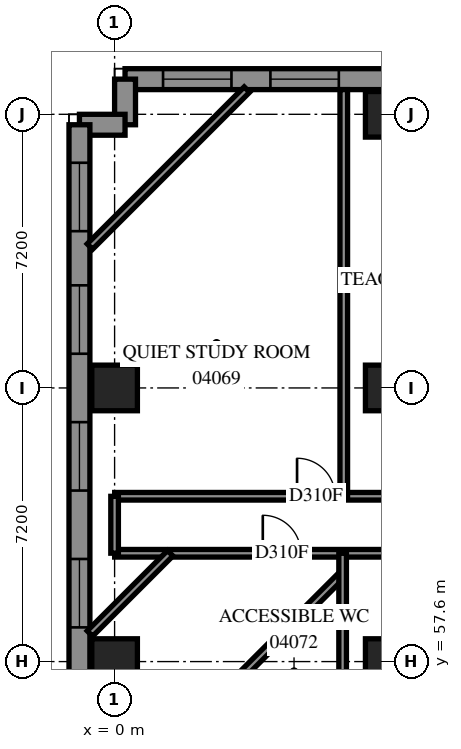
"""IFC4 building model, lengths in metres.
Left out: names, types, materials, properties, quantities, classifications, styles, units other than length and angle.
Written with IfcOpenShell. Run it as: python <this file> out.ifc"""

import sys

from ifc_helpers import new_model, si_unit, direction, frame, frame_2d, origin, origin_2d, place, context, subcontext, project, spatial, polyline, rectangle, outline, extrude, element, fill, save


model = new_model("IFC4")
c1 = context("Model", 3, precision=1e-05, world=origin(), true_north=direction((0.0, 1.0)))
c2 = subcontext(c1, "Body", "Model", "MODEL_VIEW")
j1 = project(units=[si_unit("LENGTHUNIT", "METRE"), si_unit("PLANEANGLEUNIT", "RADIAN")], contexts=[c1])
p1 = place(None, origin())
s1 = spatial("IfcSite", under=j1, at=p1, CompositionType="ELEMENT")
p2 = place(p1, origin())
s2 = spatial("IfcBuilding", under=s1, at=p2, CompositionType="ELEMENT")
p3 = place(p2, frame((0.0, 0.0, 18.6)))
s3 = spatial("IfcBuildingStorey", under=s2, at=p3, CompositionType="ELEMENT", Elevation=18.6)
for number, where, z_axis, x_axis in (
    (1, (0.0, 57.6, 0.0), (0.0, 0.0, 1.0), (1.0, 0.0, 0.0)),
    (2, (0.0, 64.8, 0.0), (0.0, 0.0, 1.0), (1.0, 0.0, 0.0)),
    (3, (7.2, 57.6, 0.0), (0.0, 0.0, 1.0), (1.0, 0.0, 0.0)),
    (4, (7.2, 64.8, 0.0), (0.0, 0.0, 1.0), (1.0, 0.0, 0.0)),
    (5, (7.2, 72.0, 0.0), (0.0, 0.0, 1.0), (1.0, 0.0, 0.0)),
):
    element("IfcColumn", number, at=place(p3, frame(where, z_axis=z_axis, x_axis=x_axis)), inside=s3, PredefinedType="COLUMN", context=c2, shape_type="SweptSolid", body=[
        extrude(rectangle(XDim=1.2, YDim=1.2, at=origin_2d()), origin(), (0.0, 0.0, 1.0), 3.8),
    ])
p4 = place(p3, frame((79.583, 72.925, 0.0), z_axis=(0.0, 0.0, 1.0), x_axis=(-1.0, 0.0, 0.0)))
e6 = element("IfcWall", 6, at=p4, inside=s3, PredefinedType="SOLIDWALL", context=c2, shape_type="SweptSolid", body=[
    extrude(outline(polyline([(-0.114, -0.275), (79.583, -0.275), (79.033, 0.275), (0.114, 0.275), (-0.114, -0.275)])), origin(), (0.0, 0.0, 1.0), 3.8),
])
p5 = place(p4, frame((1.249, 0.0, 0.7)))
e7 = element("IfcOpeningElement", 7, at=p5, cuts=e6, PredefinedType="OPENING", context=c2, shape_type="SweptSolid", body=[
    extrude(rectangle(XDim=1.8, YDim=2.4, at=frame_2d((0.9, 1.2))), frame((0.0, 0.285, 0.0), z_axis=(0.0, -1.0, 0.0), x_axis=(1.0, 0.0, 0.0)), (0.0, 0.0, 1.0), 0.57),
])
p6 = place(p4, frame((4.883, 0.0, 0.7)))
e8 = element("IfcOpeningElement", 8, at=p6, cuts=e6, PredefinedType="OPENING", context=c2, shape_type="SweptSolid", body=[
    extrude(rectangle(XDim=1.8, YDim=2.4, at=frame_2d((0.9, 1.2))), frame((0.0, 0.285, 0.0), z_axis=(0.0, -1.0, 0.0), x_axis=(1.0, 0.0, 0.0)), (0.0, 0.0, 1.0), 0.57),
])
p7 = place(p4, frame((8.483, 0.0, 0.7)))
e9 = element("IfcOpeningElement", 9, at=p7, cuts=e6, PredefinedType="OPENING", context=c2, shape_type="SweptSolid", body=[
    extrude(rectangle(XDim=1.8, YDim=2.4, at=frame_2d((0.9, 1.2))), frame((0.0, 0.285, 0.0), z_axis=(0.0, -1.0, 0.0), x_axis=(1.0, 0.0, 0.0)), (0.0, 0.0, 1.0), 0.57),
])
p8 = place(p4, frame((12.083, 0.0, 0.7)))
e10 = element("IfcOpeningElement", 10, at=p8, cuts=e6, PredefinedType="OPENING", context=c2, shape_type="SweptSolid", body=[
    extrude(rectangle(XDim=1.8, YDim=2.4, at=frame_2d((0.9, 1.2))), frame((0.0, 0.285, 0.0), z_axis=(0.0, -1.0, 0.0), x_axis=(1.0, 0.0, 0.0)), (0.0, 0.0, 1.0), 0.57),
])
p9 = place(p4, frame((15.683, 0.0, 0.7)))
e11 = element("IfcOpeningElement", 11, at=p9, cuts=e6, PredefinedType="OPENING", context=c2, shape_type="SweptSolid", body=[
    extrude(rectangle(XDim=1.8, YDim=2.4, at=frame_2d((0.9, 1.2))), frame((0.0, 0.285, 0.0), z_axis=(0.0, -1.0, 0.0), x_axis=(1.0, 0.0, 0.0)), (0.0, 0.0, 1.0), 0.57),
])
p10 = place(p4, frame((19.283, 0.0, 0.7)))
e12 = element("IfcOpeningElement", 12, at=p10, cuts=e6, PredefinedType="OPENING", context=c2, shape_type="SweptSolid", body=[
    extrude(rectangle(XDim=1.8, YDim=2.4, at=frame_2d((0.9, 1.2))), frame((0.0, 0.285, 0.0), z_axis=(0.0, -1.0, 0.0), x_axis=(1.0, 0.0, 0.0)), (0.0, 0.0, 1.0), 0.57),
])
p11 = place(p4, frame((22.883, 0.0, 0.7)))
e13 = element("IfcOpeningElement", 13, at=p11, cuts=e6, PredefinedType="OPENING", context=c2, shape_type="SweptSolid", body=[
    extrude(rectangle(XDim=1.8, YDim=2.4, at=frame_2d((0.9, 1.2))), frame((0.0, 0.285, 0.0), z_axis=(0.0, -1.0, 0.0), x_axis=(1.0, 0.0, 0.0)), (0.0, 0.0, 1.0), 0.57),
])
p12 = place(p4, frame((26.483, 0.0, 0.7)))
e14 = element("IfcOpeningElement", 14, at=p12, cuts=e6, PredefinedType="OPENING", context=c2, shape_type="SweptSolid", body=[
    extrude(rectangle(XDim=1.8, YDim=2.4, at=frame_2d((0.9, 1.2))), frame((0.0, 0.285, 0.0), z_axis=(0.0, -1.0, 0.0), x_axis=(1.0, 0.0, 0.0)), (0.0, 0.0, 1.0), 0.57),
])
p13 = place(p4, frame((30.083, 0.0, 0.7)))
e15 = element("IfcOpeningElement", 15, at=p13, cuts=e6, PredefinedType="OPENING", context=c2, shape_type="SweptSolid", body=[
    extrude(rectangle(XDim=1.8, YDim=2.4, at=frame_2d((0.9, 1.2))), frame((0.0, 0.285, 0.0), z_axis=(0.0, -1.0, 0.0), x_axis=(1.0, 0.0, 0.0)), (0.0, 0.0, 1.0), 0.57),
])
p14 = place(p4, frame((33.683, 0.0, 0.7)))
e16 = element("IfcOpeningElement", 16, at=p14, cuts=e6, PredefinedType="OPENING", context=c2, shape_type="SweptSolid", body=[
    extrude(rectangle(XDim=1.8, YDim=2.4, at=frame_2d((0.9, 1.2))), frame((0.0, 0.285, 0.0), z_axis=(0.0, -1.0, 0.0), x_axis=(1.0, 0.0, 0.0)), (0.0, 0.0, 1.0), 0.57),
])
p15 = place(p4, frame((37.283, 0.0, 0.7)))
e17 = element("IfcOpeningElement", 17, at=p15, cuts=e6, PredefinedType="OPENING", context=c2, shape_type="SweptSolid", body=[
    extrude(rectangle(XDim=1.8, YDim=2.4, at=frame_2d((0.9, 1.2))), frame((0.0, 0.285, 0.0), z_axis=(0.0, -1.0, 0.0), x_axis=(1.0, 0.0, 0.0)), (0.0, 0.0, 1.0), 0.57),
])
p16 = place(p4, frame((40.883, 0.0, 0.7)))
e18 = element("IfcOpeningElement", 18, at=p16, cuts=e6, PredefinedType="OPENING", context=c2, shape_type="SweptSolid", body=[
    extrude(rectangle(XDim=1.8, YDim=2.4, at=frame_2d((0.9, 1.2))), frame((0.0, 0.285, 0.0), z_axis=(0.0, -1.0, 0.0), x_axis=(1.0, 0.0, 0.0)), (0.0, 0.0, 1.0), 0.57),
])
p17 = place(p4, frame((44.483, 0.0, 0.7)))
e19 = element("IfcOpeningElement", 19, at=p17, cuts=e6, PredefinedType="OPENING", context=c2, shape_type="SweptSolid", body=[
    extrude(rectangle(XDim=1.8, YDim=2.4, at=frame_2d((0.9, 1.2))), frame((0.0, 0.285, 0.0), z_axis=(0.0, -1.0, 0.0), x_axis=(1.0, 0.0, 0.0)), (0.0, 0.0, 1.0), 0.57),
])
p18 = place(p4, frame((48.083, 0.0, 0.7)))
e20 = element("IfcOpeningElement", 20, at=p18, cuts=e6, PredefinedType="OPENING", context=c2, shape_type="SweptSolid", body=[
    extrude(rectangle(XDim=1.8, YDim=2.4, at=frame_2d((0.9, 1.2))), frame((0.0, 0.285, 0.0), z_axis=(0.0, -1.0, 0.0), x_axis=(1.0, 0.0, 0.0)), (0.0, 0.0, 1.0), 0.57),
])
p19 = place(p4, frame((51.683, 0.0, 0.7)))
e21 = element("IfcOpeningElement", 21, at=p19, cuts=e6, PredefinedType="OPENING", context=c2, shape_type="SweptSolid", body=[
    extrude(rectangle(XDim=1.8, YDim=2.4, at=frame_2d((0.9, 1.2))), frame((0.0, 0.285, 0.0), z_axis=(0.0, -1.0, 0.0), x_axis=(1.0, 0.0, 0.0)), (0.0, 0.0, 1.0), 0.57),
])
p20 = place(p4, frame((55.283, 0.0, 0.7)))
e22 = element("IfcOpeningElement", 22, at=p20, cuts=e6, PredefinedType="OPENING", context=c2, shape_type="SweptSolid", body=[
    extrude(rectangle(XDim=1.8, YDim=2.4, at=frame_2d((0.9, 1.2))), frame((0.0, 0.285, 0.0), z_axis=(0.0, -1.0, 0.0), x_axis=(1.0, 0.0, 0.0)), (0.0, 0.0, 1.0), 0.57),
])
p21 = place(p4, frame((58.883, 0.0, 0.7)))
e23 = element("IfcOpeningElement", 23, at=p21, cuts=e6, PredefinedType="OPENING", context=c2, shape_type="SweptSolid", body=[
    extrude(rectangle(XDim=1.8, YDim=2.4, at=frame_2d((0.9, 1.2))), frame((0.0, 0.285, 0.0), z_axis=(0.0, -1.0, 0.0), x_axis=(1.0, 0.0, 0.0)), (0.0, 0.0, 1.0), 0.57),
])
p22 = place(p4, frame((62.483, 0.0, 0.7)))
e24 = element("IfcOpeningElement", 24, at=p22, cuts=e6, PredefinedType="OPENING", context=c2, shape_type="SweptSolid", body=[
    extrude(rectangle(XDim=1.8, YDim=2.4, at=frame_2d((0.9, 1.2))), frame((0.0, 0.285, 0.0), z_axis=(0.0, -1.0, 0.0), x_axis=(1.0, 0.0, 0.0)), (0.0, 0.0, 1.0), 0.57),
])
p23 = place(p4, frame((66.083, 0.0, 0.7)))
e25 = element("IfcOpeningElement", 25, at=p23, cuts=e6, PredefinedType="OPENING", context=c2, shape_type="SweptSolid", body=[
    extrude(rectangle(XDim=1.8, YDim=2.4, at=frame_2d((0.9, 1.2))), frame((0.0, 0.285, 0.0), z_axis=(0.0, -1.0, 0.0), x_axis=(1.0, 0.0, 0.0)), (0.0, 0.0, 1.0), 0.57),
])
p24 = place(p4, frame((69.683, 0.0, 0.7)))
e26 = element("IfcOpeningElement", 26, at=p24, cuts=e6, PredefinedType="OPENING", context=c2, shape_type="SweptSolid", body=[
    extrude(rectangle(XDim=1.8, YDim=2.4, at=frame_2d((0.9, 1.2))), frame((0.0, 0.285, 0.0), z_axis=(0.0, -1.0, 0.0), x_axis=(1.0, 0.0, 0.0)), (0.0, 0.0, 1.0), 0.57),
])
p25 = place(p4, frame((73.683, 0.0, 0.7)))
e27 = element("IfcOpeningElement", 27, at=p25, cuts=e6, PredefinedType="OPENING", context=c2, shape_type="SweptSolid", body=[
    extrude(rectangle(XDim=1.8, YDim=2.4, at=frame_2d((0.9, 1.2))), frame((0.0, 0.285, 0.0), z_axis=(0.0, -1.0, 0.0), x_axis=(1.0, 0.0, 0.0)), (0.0, 0.0, 1.0), 0.57),
])
p26 = place(p4, frame((76.508, 0.0, 0.7)))
e28 = element("IfcOpeningElement", 28, at=p26, cuts=e6, PredefinedType="OPENING", context=c2, shape_type="SweptSolid", body=[
    extrude(rectangle(XDim=1.8, YDim=2.4, at=frame_2d((0.9, 1.2))), frame((0.0, 0.285, 0.0), z_axis=(0.0, -1.0, 0.0), x_axis=(1.0, 0.0, 0.0)), (0.0, 0.0, 1.0), 0.57),
])
p27 = place(p3, frame((0.275, 72.925, 0.0), z_axis=(0.0, 0.0, 1.0), x_axis=(0.0, -1.0, 0.0)))
e29 = element("IfcWall", 29, at=p27, inside=s3, PredefinedType="SOLIDWALL", context=c2, shape_type="SweptSolid", body=[
    extrude(outline(polyline([(-0.275, -0.275), (0.925, -0.275), (1.475, 0.275), (0.275, 0.275), (-0.275, -0.275)])), origin(), (0.0, 0.0, 1.0), 3.8),
])
p28 = place(p3, frame((0.275, 71.725, 0.0), z_axis=(0.0, 0.0, 1.0), x_axis=(-1.0, 0.0, 0.0)))
e30 = element("IfcWall", 30, at=p28, inside=s3, PredefinedType="SOLIDWALL", context=c2, shape_type="SweptSolid", body=[
    extrude(outline(polyline([(0.275, -0.275), (1.475, -0.275), (0.925, 0.275), (-0.275, 0.275), (0.275, -0.275)])), origin(), (0.0, 0.0, 1.0), 3.8),
])
p29 = place(p3, frame((-0.925, 71.725, 0.0), z_axis=(0.0, 0.0, 1.0), x_axis=(0.0, -1.0, 0.0)))
e31 = element("IfcWall", 31, at=p29, inside=s3, PredefinedType="SOLIDWALL", context=c2, shape_type="SweptSolid", body=[
    extrude(outline(polyline([(-0.275, -0.275), (28.525, -0.275), (27.975, 0.275), (0.275, 0.275), (-0.275, -0.275)])), origin(), (0.0, 0.0, 1.0), 3.8),
])
p30 = place(p29, frame((1.0, 0.0, 0.7)))
e32 = element("IfcOpeningElement", 32, at=p30, cuts=e31, PredefinedType="OPENING", context=c2, shape_type="SweptSolid", body=[
    extrude(rectangle(XDim=1.8, YDim=2.4, at=frame_2d((0.9, 1.2))), frame((0.0, 0.285, 0.0), z_axis=(0.0, -1.0, 0.0), x_axis=(1.0, 0.0, 0.0)), (0.0, 0.0, 1.0), 0.57),
])
p31 = place(p29, frame((4.225, 0.0, 0.7)))
e33 = element("IfcOpeningElement", 33, at=p31, cuts=e31, PredefinedType="OPENING", context=c2, shape_type="SweptSolid", body=[
    extrude(rectangle(XDim=1.8, YDim=2.4, at=frame_2d((0.9, 1.2))), frame((0.0, 0.285, 0.0), z_axis=(0.0, -1.0, 0.0), x_axis=(1.0, 0.0, 0.0)), (0.0, 0.0, 1.0), 0.57),
])
p32 = place(p29, frame((7.825, 0.0, 0.7)))
e34 = element("IfcOpeningElement", 34, at=p32, cuts=e31, PredefinedType="OPENING", context=c2, shape_type="SweptSolid", body=[
    extrude(rectangle(XDim=1.8, YDim=2.4, at=frame_2d((0.9, 1.2))), frame((0.0, 0.285, 0.0), z_axis=(0.0, -1.0, 0.0), x_axis=(1.0, 0.0, 0.0)), (0.0, 0.0, 1.0), 0.57),
])
p33 = place(p29, frame((11.425, 0.0, 0.7)))
e35 = element("IfcOpeningElement", 35, at=p33, cuts=e31, PredefinedType="OPENING", context=c2, shape_type="SweptSolid", body=[
    extrude(rectangle(XDim=1.8, YDim=2.4, at=frame_2d((0.9, 1.2))), frame((0.0, 0.285, 0.0), z_axis=(0.0, -1.0, 0.0), x_axis=(1.0, 0.0, 0.0)), (0.0, 0.0, 1.0), 0.57),
])
p34 = place(p29, frame((15.025, 0.0, 0.7)))
e36 = element("IfcOpeningElement", 36, at=p34, cuts=e31, PredefinedType="OPENING", context=c2, shape_type="SweptSolid", body=[
    extrude(rectangle(XDim=1.8, YDim=2.4, at=frame_2d((0.9, 1.2))), frame((0.0, 0.285, 0.0), z_axis=(0.0, -1.0, 0.0), x_axis=(1.0, 0.0, 0.0)), (0.0, 0.0, 1.0), 0.57),
])
p35 = place(p29, frame((18.625, 0.0, 0.7)))
e37 = element("IfcOpeningElement", 37, at=p35, cuts=e31, PredefinedType="OPENING", context=c2, shape_type="SweptSolid", body=[
    extrude(rectangle(XDim=1.8, YDim=2.4, at=frame_2d((0.9, 1.2))), frame((0.0, 0.285, 0.0), z_axis=(0.0, -1.0, 0.0), x_axis=(1.0, 0.0, 0.0)), (0.0, 0.0, 1.0), 0.57),
])
p36 = place(p29, frame((21.625, 0.0, 0.7)))
e38 = element("IfcOpeningElement", 38, at=p36, cuts=e31, PredefinedType="OPENING", context=c2, shape_type="SweptSolid", body=[
    extrude(rectangle(XDim=1.8, YDim=2.4, at=frame_2d((0.9, 1.2))), frame((0.0, 0.285, 0.0), z_axis=(0.0, -1.0, 0.0), x_axis=(1.0, 0.0, 0.0)), (0.0, 0.0, 1.0), 0.57),
])
p37 = place(p29, frame((25.45, 0.0, 0.7)))
e39 = element("IfcOpeningElement", 39, at=p37, cuts=e31, PredefinedType="OPENING", context=c2, shape_type="SweptSolid", body=[
    extrude(rectangle(XDim=1.8, YDim=2.4, at=frame_2d((0.9, 1.2))), frame((0.0, 0.285, 0.0), z_axis=(0.0, -1.0, 0.0), x_axis=(1.0, 0.0, 0.0)), (0.0, 0.0, 1.0), 0.57),
])
p38 = place(p3, frame((0.002, 60.45, 0.0), z_axis=(0.0, 0.0, 1.0), x_axis=(1.0, 0.0, 0.0)))
e40 = element("IfcWall", 40, at=p38, inside=s3, PredefinedType="PARTITIONING", context=c2, shape_type="SweptSolid", body=[
    extrude(rectangle(XDim=55.098, YDim=0.2, at=frame_2d((27.549, 0.0))), origin(), (0.0, 0.0, 1.0), 3.8),
])
p39 = place(p38, frame((49.69, 0.0, 0.0)))
e41 = element("IfcOpeningElement", 41, at=p39, cuts=e40, PredefinedType="OPENING", context=c2, shape_type="SweptSolid", body=[
    extrude(rectangle(XDim=1.0, YDim=2.1, at=frame_2d((0.5, 1.05))), frame((0.0, 0.11, 0.0), z_axis=(0.0, -1.0, 0.0), x_axis=(1.0, 0.0, 0.0)), (0.0, 0.0, 1.0), 0.22),
])
p40 = place(p38, frame((3.897, 0.0, 0.0)))
e42 = element("IfcOpeningElement", 42, at=p40, cuts=e40, PredefinedType="OPENING", context=c2, shape_type="SweptSolid", body=[
    extrude(rectangle(XDim=1.0, YDim=2.1, at=frame_2d((0.5, 1.05))), frame((0.0, 0.11, 0.0), z_axis=(0.0, -1.0, 0.0), x_axis=(1.0, 0.0, 0.0)), (0.0, 0.0, 1.0), 0.22),
])
p41 = place(p3, frame((0.002, 61.95, 0.0), z_axis=(0.0, 0.0, 1.0), x_axis=(1.0, 0.0, 0.0)))
e43 = element("IfcWall", 43, at=p41, inside=s3, PredefinedType="PARTITIONING", context=c2, shape_type="SweptSolid", body=[
    extrude(rectangle(XDim=55.098, YDim=0.2, at=frame_2d((27.549, 0.0))), origin(), (0.0, 0.0, 1.0), 3.8),
])
p42 = place(p41, frame((8.667, 0.0, 0.0)))
e44 = element("IfcOpeningElement", 44, at=p42, cuts=e43, PredefinedType="OPENING", context=c2, shape_type="SweptSolid", body=[
    extrude(rectangle(XDim=1.0, YDim=2.1, at=frame_2d((0.5, 1.05))), frame((0.0, 0.11, 0.0), z_axis=(0.0, -1.0, 0.0), x_axis=(1.0, 0.0, 0.0)), (0.0, 0.0, 1.0), 0.22),
])
p43 = place(p41, frame((13.136, 0.0, 0.0)))
e45 = element("IfcOpeningElement", 45, at=p43, cuts=e43, PredefinedType="OPENING", context=c2, shape_type="SweptSolid", body=[
    extrude(rectangle(XDim=1.0, YDim=2.1, at=frame_2d((0.5, 1.05))), frame((0.0, 0.11, 0.0), z_axis=(0.0, -1.0, 0.0), x_axis=(1.0, 0.0, 0.0)), (0.0, 0.0, 1.0), 0.22),
])
p44 = place(p41, frame((20.335, 0.0, 0.0)))
e46 = element("IfcOpeningElement", 46, at=p44, cuts=e43, PredefinedType="OPENING", context=c2, shape_type="SweptSolid", body=[
    extrude(rectangle(XDim=1.0, YDim=2.1, at=frame_2d((0.5, 1.05))), frame((0.0, 0.11, 0.0), z_axis=(0.0, -1.0, 0.0), x_axis=(1.0, 0.0, 0.0)), (0.0, 0.0, 1.0), 0.22),
])
p45 = place(p41, frame((27.535, 0.0, 0.0)))
e47 = element("IfcOpeningElement", 47, at=p45, cuts=e43, PredefinedType="OPENING", context=c2, shape_type="SweptSolid", body=[
    extrude(rectangle(XDim=1.0, YDim=2.1, at=frame_2d((0.5, 1.05))), frame((0.0, 0.11, 0.0), z_axis=(0.0, -1.0, 0.0), x_axis=(1.0, 0.0, 0.0)), (0.0, 0.0, 1.0), 0.22),
])
p46 = place(p41, frame((34.736, 0.0, 0.0)))
e48 = element("IfcOpeningElement", 48, at=p46, cuts=e43, PredefinedType="OPENING", context=c2, shape_type="SweptSolid", body=[
    extrude(rectangle(XDim=1.0, YDim=2.1, at=frame_2d((0.5, 1.05))), frame((0.0, 0.11, 0.0), z_axis=(0.0, -1.0, 0.0), x_axis=(1.0, 0.0, 0.0)), (0.0, 0.0, 1.0), 0.22),
])
p47 = place(p41, frame((41.935, 0.0, 0.0)))
e49 = element("IfcOpeningElement", 49, at=p47, cuts=e43, PredefinedType="OPENING", context=c2, shape_type="SweptSolid", body=[
    extrude(rectangle(XDim=1.0, YDim=2.1, at=frame_2d((0.5, 1.05))), frame((0.0, 0.11, 0.0), z_axis=(0.0, -1.0, 0.0), x_axis=(1.0, 0.0, 0.0)), (0.0, 0.0, 1.0), 0.22),
])
p48 = place(p41, frame((49.136, 0.0, 0.0)))
e50 = element("IfcOpeningElement", 50, at=p48, cuts=e43, PredefinedType="OPENING", context=c2, shape_type="SweptSolid", body=[
    extrude(rectangle(XDim=1.0, YDim=2.1, at=frame_2d((0.5, 1.05))), frame((0.0, 0.11, 0.0), z_axis=(0.0, -1.0, 0.0), x_axis=(1.0, 0.0, 0.0)), (0.0, 0.0, 1.0), 0.22),
])
p49 = place(p41, frame((4.799, 0.0, 0.0)))
e51 = element("IfcOpeningElement", 51, at=p49, cuts=e43, PredefinedType="OPENING", context=c2, shape_type="SweptSolid", body=[
    extrude(rectangle(XDim=1.0, YDim=2.1, at=frame_2d((0.5, 1.05))), frame((0.0, 0.11, 0.0), z_axis=(0.0, -1.0, 0.0), x_axis=(1.0, 0.0, 0.0)), (0.0, 0.0, 1.0), 0.22),
])
p50 = place(p3, frame((6.03, 61.95, 0.0), z_axis=(0.0, 0.0, 1.0), x_axis=(0.0, 1.0, 0.0)))
e52 = element("IfcWall", 52, at=p50, inside=s3, PredefinedType="PARTITIONING", context=c2, shape_type="SweptSolid", body=[
    extrude(rectangle(XDim=10.7, YDim=0.2, at=frame_2d((5.35, 0.0))), origin(), (0.0, 0.0, 1.0), 3.8),
])
p51 = place(p3, frame((0.855, 54.751, 0.0), z_axis=(0.0, 0.0, 1.0), x_axis=(0.7071067812, 0.7071067812, 0.0)))
e53 = element("IfcWall", 53, at=p51, inside=s3, PredefinedType="PARTITIONING", context=c2, shape_type="SweptSolid", body=[
    extrude(rectangle(XDim=7.275, YDim=0.2, at=frame_2d((3.637, 0.0))), origin(), (0.0, 0.0, 1.0), 3.8),
])
p52 = place(p3, frame((-0.65, 68.519, 0.0), z_axis=(0.0, 0.0, 1.0), x_axis=(0.7071067812, 0.7071067812, 0.0)))
e54 = element("IfcWall", 54, at=p52, inside=s3, PredefinedType="PARTITIONING", context=c2, shape_type="SweptSolid", body=[
    extrude(rectangle(XDim=5.842, YDim=0.2, at=frame_2d((2.921, 0.0))), origin(), (0.0, 0.0, 1.0), 3.8),
])
p53 = place(p3, frame((6.0, 54.802, 0.0), z_axis=(0.0, 0.0, 1.0), x_axis=(0.0, 1.0, 0.0)))
e55 = element("IfcWall", 55, at=p53, inside=s3, PredefinedType="PARTITIONING", context=c2, shape_type="SweptSolid", body=[
    extrude(rectangle(XDim=5.648, YDim=0.2, at=frame_2d((2.824, 0.0))), origin(), (0.0, 0.0, 1.0), 3.8),
])
p54 = place(p3, frame((-0.65, 58.337, 0.0), z_axis=(0.0, 0.0, 1.0), x_axis=(0.7071067812, 0.7071067812, 0.0)))
e56 = element("IfcWall", 56, at=p54, inside=s3, PredefinedType="PARTITIONING", context=c2, shape_type="SweptSolid", body=[
    extrude(rectangle(XDim=2.989, YDim=0.2, at=frame_2d((1.495, 0.0))), origin(), (0.0, 0.0, 1.0), 3.8),
])
p55 = place(p3, frame((0.0, 60.452, 0.0), z_axis=(0.0, 0.0, 1.0), x_axis=(0.0, 1.0, 0.0)))
e57 = element("IfcWall", 57, at=p55, inside=s3, PredefinedType="PARTITIONING", context=c2, shape_type="SweptSolid", body=[
    extrude(rectangle(XDim=1.496, YDim=0.2, at=frame_2d((0.748, 0.0))), origin(), (0.0, 0.0, 1.0), 3.2),
])
p56 = place(p25, origin())
e58 = element("IfcWindow", 58, at=p56, inside=s3, PartitioningType="SINGLE_PANEL", PredefinedType="WINDOW", context=c2, shape_type="SweptSolid", body=[
    extrude(rectangle(XDim=1.8, YDim=2.4, at=frame_2d((0.9, 1.2))), frame((0.0, 0.155, 0.0), z_axis=(0.0, -1.0, 0.0), x_axis=(1.0, 0.0, 0.0)), (0.0, 0.0, 1.0), 0.06),
])
fill(e27, e58)
p57 = place(p26, origin())
e59 = element("IfcWindow", 59, at=p57, inside=s3, PartitioningType="SINGLE_PANEL", PredefinedType="WINDOW", context=c2, shape_type="SweptSolid", body=[
    extrude(rectangle(XDim=1.8, YDim=2.4, at=frame_2d((0.9, 1.2))), frame((0.0, 0.155, 0.0), z_axis=(0.0, -1.0, 0.0), x_axis=(1.0, 0.0, 0.0)), (0.0, 0.0, 1.0), 0.06),
])
fill(e28, e59)
p58 = place(p30, origin())
e60 = element("IfcWindow", 60, at=p58, inside=s3, PartitioningType="SINGLE_PANEL", PredefinedType="WINDOW", context=c2, shape_type="SweptSolid", body=[
    extrude(rectangle(XDim=1.8, YDim=2.4, at=frame_2d((0.9, 1.2))), frame((0.0, 0.155, 0.0), z_axis=(0.0, -1.0, 0.0), x_axis=(1.0, 0.0, 0.0)), (0.0, 0.0, 1.0), 0.06),
])
fill(e32, e60)
p59 = place(p31, origin())
e61 = element("IfcWindow", 61, at=p59, inside=s3, PartitioningType="SINGLE_PANEL", PredefinedType="WINDOW", context=c2, shape_type="SweptSolid", body=[
    extrude(rectangle(XDim=1.8, YDim=2.4, at=frame_2d((0.9, 1.2))), frame((0.0, 0.155, 0.0), z_axis=(0.0, -1.0, 0.0), x_axis=(1.0, 0.0, 0.0)), (0.0, 0.0, 1.0), 0.06),
])
fill(e33, e61)
p60 = place(p32, origin())
e62 = element("IfcWindow", 62, at=p60, inside=s3, PartitioningType="SINGLE_PANEL", PredefinedType="WINDOW", context=c2, shape_type="SweptSolid", body=[
    extrude(rectangle(XDim=1.8, YDim=2.4, at=frame_2d((0.9, 1.2))), frame((0.0, 0.155, 0.0), z_axis=(0.0, -1.0, 0.0), x_axis=(1.0, 0.0, 0.0)), (0.0, 0.0, 1.0), 0.06),
])
fill(e34, e62)
p61 = place(p33, origin())
e63 = element("IfcWindow", 63, at=p61, inside=s3, PartitioningType="SINGLE_PANEL", PredefinedType="WINDOW", context=c2, shape_type="SweptSolid", body=[
    extrude(rectangle(XDim=1.8, YDim=2.4, at=frame_2d((0.9, 1.2))), frame((0.0, 0.155, 0.0), z_axis=(0.0, -1.0, 0.0), x_axis=(1.0, 0.0, 0.0)), (0.0, 0.0, 1.0), 0.06),
])
fill(e35, e63)
p62 = place(p49, origin())
e64 = element("IfcDoor", 64, at=p62, inside=s3, OperationType="SINGLE_SWING_LEFT", PredefinedType="DOOR", context=c2, shape_type="SweptSolid", body=[
    extrude(rectangle(XDim=1.0, YDim=2.1, at=frame_2d((0.5, 1.05))), frame((0.0, 0.025, 0.0), z_axis=(0.0, -1.0, 0.0), x_axis=(1.0, 0.0, 0.0)), (0.0, 0.0, 1.0), 0.05),
])
fill(e51, e64)
p63 = place(p40, origin())
e65 = element("IfcDoor", 65, at=p63, inside=s3, OperationType="SINGLE_SWING_LEFT", PredefinedType="DOOR", context=c2, shape_type="SweptSolid", body=[
    extrude(rectangle(XDim=1.0, YDim=2.1, at=frame_2d((0.5, 1.05))), frame((0.0, 0.025, 0.0), z_axis=(0.0, -1.0, 0.0), x_axis=(1.0, 0.0, 0.0)), (0.0, 0.0, 1.0), 0.05),
])
fill(e42, e65)
save(model, sys.argv[1])
